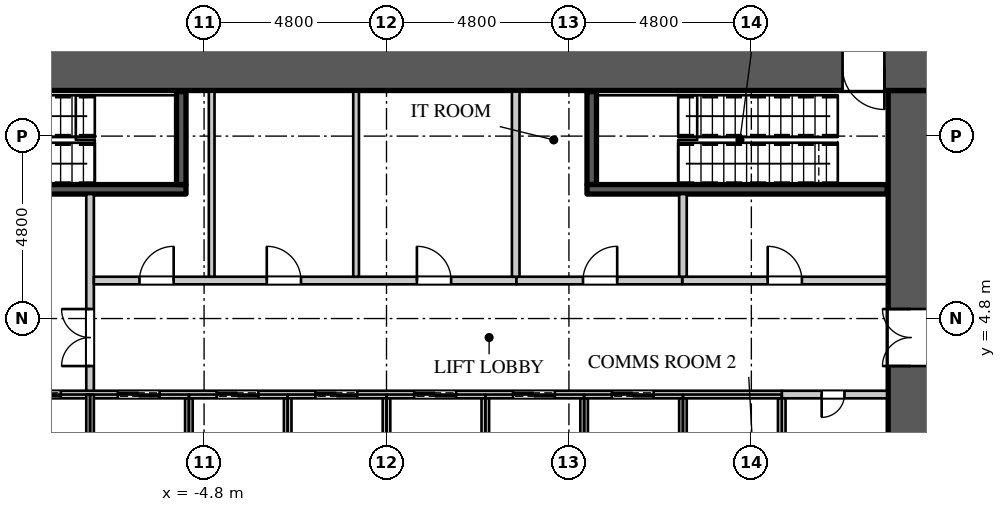
"""IFC4 building model, lengths in metres.
Left out: names, types, materials, properties, quantities, classifications, styles, units other than length and angle.
Written with IfcOpenShell. Run it as: python <this file> out.ifc"""

import sys

from ifc_helpers import new_model, si_unit, direction, frame, frame_2d, origin, place, context, subcontext, project, spatial, rectangle, extrude, element, fill, save


model = new_model("IFC4")
c1 = context("Model", 3, precision=1e-05, world=origin(), true_north=direction((0.0, 1.0)))
c2 = subcontext(c1, "Body", "Model", "MODEL_VIEW")
j1 = project(units=[si_unit("LENGTHUNIT", "METRE"), si_unit("PLANEANGLEUNIT", "RADIAN")], contexts=[c1])
p1 = place(None, origin())
s1 = spatial("IfcSite", under=j1, at=p1, CompositionType="ELEMENT")
p2 = place(p1, origin())
s2 = spatial("IfcBuilding", under=s1, at=p2, CompositionType="ELEMENT")
p3 = place(p2, frame((0.0, 0.0, 11.0)))
s3 = spatial("IfcBuildingStorey", under=s2, at=p3, CompositionType="ELEMENT", Elevation=11.0)
p4 = place(p3, frame((-14.4, 11.4, 0.0), z_axis=(0.0, 0.0, 1.0), x_axis=(1.0, 0.0, 0.0)))
e1 = element("IfcWall", 1, at=p4, inside=s3, PredefinedType="SHEAR", context=c2, shape_type="SweptSolid", body=[
    extrude(rectangle(XDim=28.8, YDim=1.2, at=frame_2d((14.4, 0.0))), origin(), (0.0, 0.0, 1.0), 5.0),
])
p5 = place(p4, frame((1.3, 0.0, 0.0)))
e2 = element("IfcOpeningElement", 2, at=p5, cuts=e1, PredefinedType="OPENING", context=c2, shape_type="SweptSolid", body=[
    extrude(rectangle(XDim=1.1, YDim=2.2, at=frame_2d((0.55, 1.1))), frame((0.0, 0.61, 0.0), z_axis=(0.0, -1.0, 0.0), x_axis=(1.0, 0.0, 0.0)), (0.0, 0.0, 1.0), 1.22),
])
p6 = place(p4, frame((26.4, 0.0, 0.0)))
e3 = element("IfcOpeningElement", 3, at=p6, cuts=e1, PredefinedType="OPENING", context=c2, shape_type="SweptSolid", body=[
    extrude(rectangle(XDim=1.1, YDim=2.2, at=frame_2d((0.55, 1.1))), frame((0.0, 0.61, 0.0), z_axis=(0.0, -1.0, 0.0), x_axis=(1.0, 0.0, 0.0)), (0.0, 0.0, 1.0), 1.22),
])
p7 = place(p3, frame((13.8, -10.8, 0.0), z_axis=(0.0, 0.0, 1.0), x_axis=(0.0, 1.0, 0.0)))
e4 = element("IfcWall", 4, at=p7, inside=s3, PredefinedType="SHEAR", context=c2, shape_type="SweptSolid", body=[
    extrude(rectangle(XDim=21.6, YDim=1.2, at=frame_2d((10.8, 0.0))), origin(), (0.0, 0.0, 1.0), 5.0),
])
p8 = place(p7, frame((14.35, 0.0, 0.0)))
e5 = element("IfcOpeningElement", 5, at=p8, cuts=e4, PredefinedType="OPENING", context=c2, shape_type="SweptSolid", body=[
    extrude(rectangle(XDim=1.5, YDim=2.4, at=frame_2d((0.75, 1.2))), frame((0.0, 0.61, 0.0), z_axis=(0.0, -1.0, 0.0), x_axis=(1.0, 0.0, 0.0)), (0.0, 0.0, 1.0), 1.22),
])
p9 = place(p7, frame((5.75, 0.0, 0.0)))
e6 = element("IfcOpeningElement", 6, at=p9, cuts=e4, PredefinedType="OPENING", context=c2, shape_type="SweptSolid", body=[
    extrude(rectangle(XDim=1.5, YDim=2.4, at=frame_2d((0.75, 1.2))), frame((0.0, 0.61, 0.0), z_axis=(0.0, -1.0, 0.0), x_axis=(1.0, 0.0, 0.0)), (0.0, 0.0, 1.0), 1.22),
])
p10 = place(p3, frame((-7.8, 2.8, 0.0), z_axis=(0.0, 0.0, 1.0), x_axis=(0.0, 1.0, 0.0)))
e7 = element("IfcWall", 7, at=p10, inside=s3, PredefinedType="PARTITIONING", context=c2, shape_type="SweptSolid", body=[
    extrude(rectangle(XDim=5.275, YDim=0.2, at=frame_2d((2.637, 0.0))), origin(), (0.0, 0.0, 1.0), 4.65),
])
p11 = place(p10, frame((0.75, 0.0, 0.0)))
e8 = element("IfcOpeningElement", 8, at=p11, cuts=e7, PredefinedType="OPENING", context=c2, shape_type="SweptSolid", body=[
    extrude(rectangle(XDim=1.5, YDim=2.4, at=frame_2d((0.75, 1.2))), frame((0.0, 0.11, 0.0), z_axis=(0.0, -1.0, 0.0), x_axis=(1.0, 0.0, 0.0)), (0.0, 0.0, 1.0), 0.22),
])
p12 = place(p3, frame((-7.7, 5.8, 0.0), z_axis=(0.0, 0.0, 1.0), x_axis=(1.0, 0.0, 0.0)))
e9 = element("IfcWall", 9, at=p12, inside=s3, PredefinedType="PARTITIONING", context=c2, shape_type="SweptSolid", body=[
    extrude(rectangle(XDim=11.12, YDim=0.2, at=frame_2d((5.56, 0.0))), origin(), (0.0, 0.0, 1.0), 4.65),
])
p13 = place(p12, frame((1.2, 0.0, 0.0)))
e10 = element("IfcOpeningElement", 10, at=p13, cuts=e9, PredefinedType="OPENING", context=c2, shape_type="SweptSolid", body=[
    extrude(rectangle(XDim=0.9, YDim=2.2, at=frame_2d((0.45, 1.1))), frame((0.0, 0.11, 0.0), z_axis=(0.0, -1.0, 0.0), x_axis=(1.0, 0.0, 0.0)), (0.0, 0.0, 1.0), 0.22),
])
p14 = place(p12, frame((4.55, 0.0, 0.0)))
e11 = element("IfcOpeningElement", 11, at=p14, cuts=e9, PredefinedType="OPENING", context=c2, shape_type="SweptSolid", body=[
    extrude(rectangle(XDim=0.9, YDim=2.2, at=frame_2d((0.45, 1.1))), frame((0.0, 0.11, 0.0), z_axis=(0.0, -1.0, 0.0), x_axis=(1.0, 0.0, 0.0)), (0.0, 0.0, 1.0), 0.22),
])
p15 = place(p12, frame((8.5, 0.0, 0.0)))
e12 = element("IfcOpeningElement", 12, at=p15, cuts=e9, PredefinedType="OPENING", context=c2, shape_type="SweptSolid", body=[
    extrude(rectangle(XDim=0.9, YDim=2.2, at=frame_2d((0.45, 1.1))), frame((0.0, 0.11, 0.0), z_axis=(0.0, -1.0, 0.0), x_axis=(1.0, 0.0, 0.0)), (0.0, 0.0, 1.0), 0.22),
])
p16 = place(p3, frame((7.78, 5.8, 0.0), z_axis=(0.0, 0.0, 1.0), x_axis=(1.0, 0.0, 0.0)))
e13 = element("IfcWall", 13, at=p16, inside=s3, PredefinedType="PARTITIONING", context=c2, shape_type="SweptSolid", body=[
    extrude(rectangle(XDim=5.39, YDim=0.2, at=frame_2d((2.695, 0.0))), origin(), (0.0, 0.0, 1.0), 4.65),
])
p17 = place(p16, frame((2.25, 0.0, 0.0)))
e14 = element("IfcOpeningElement", 14, at=p17, cuts=e13, PredefinedType="OPENING", context=c2, shape_type="SweptSolid", body=[
    extrude(rectangle(XDim=0.9, YDim=2.2, at=frame_2d((0.45, 1.1))), frame((0.0, 0.11, 0.0), z_axis=(0.0, -1.0, 0.0), x_axis=(1.0, 0.0, 0.0)), (0.0, 0.0, 1.0), 0.22),
])
for number, where, z_axis, x_axis in (
    (15, (-4.6, 5.9, 0.0), (0.0, 0.0, 1.0), (0.0, 1.0, 0.0)),
    (16, (-0.8, 5.9, 0.0), (0.0, 0.0, 1.0), (0.0, 1.0, 0.0)),
):
    element("IfcWall", number, at=place(p3, frame(where, z_axis=z_axis, x_axis=x_axis)), inside=s3, PredefinedType="PARTITIONING", context=c2, shape_type="SweptSolid", body=[
        extrude(rectangle(XDim=4.87, YDim=0.15, at=frame_2d((2.435, 0.0))), origin(), (0.0, 0.0, 1.0), 4.65),
    ])
p18 = place(p3, frame((3.42, 5.8, 0.0), z_axis=(0.0, 0.0, 1.0), x_axis=(1.0, 0.0, 0.0)))
e17 = element("IfcWall", 17, at=p18, inside=s3, PredefinedType="PARTITIONING", context=c2, shape_type="SweptSolid", body=[
    extrude(rectangle(XDim=4.36, YDim=0.2, at=frame_2d((2.18, 0.0))), origin(), (0.0, 0.0, 1.0), 4.65),
])
p19 = place(p18, frame((1.75, 0.0, 0.0)))
e18 = element("IfcOpeningElement", 18, at=p19, cuts=e17, PredefinedType="OPENING", context=c2, shape_type="SweptSolid", body=[
    extrude(rectangle(XDim=0.9, YDim=2.2, at=frame_2d((0.45, 1.1))), frame((0.0, 0.11, 0.0), z_axis=(0.0, -1.0, 0.0), x_axis=(1.0, 0.0, 0.0)), (0.0, 0.0, 1.0), 0.22),
])
p20 = place(p3, frame((3.4, 5.9, 0.0), z_axis=(0.0, 0.0, 1.0), x_axis=(0.0, 1.0, 0.0)))
e19 = element("IfcWall", 19, at=p20, inside=s3, PredefinedType="PARTITIONING", context=c2, shape_type="SweptSolid", body=[
    extrude(rectangle(XDim=4.87, YDim=0.2, at=frame_2d((2.435, 0.0))), origin(), (0.0, 0.0, 1.0), 4.65),
])
p21 = place(p3, frame((7.8, 5.9, 0.0), z_axis=(0.0, 0.0, 1.0), x_axis=(0.0, 1.0, 0.0)))
e20 = element("IfcWall", 20, at=p21, inside=s3, PredefinedType="PARTITIONING", context=c2, shape_type="SweptSolid", body=[
    extrude(rectangle(XDim=2.175, YDim=0.2, at=frame_2d((1.087, 0.0))), origin(), (0.0, 0.0, 1.0), 4.65),
])
p22 = place(p3, frame((10.4, 2.8, 0.0), z_axis=(0.0, 0.0, 1.0), x_axis=(1.0, 0.0, 0.0)))
e21 = element("IfcWall", 21, at=p22, inside=s3, PredefinedType="PARTITIONING", context=c2, shape_type="SweptSolid", body=[
    extrude(rectangle(XDim=2.77, YDim=0.2, at=frame_2d((1.385, 0.0))), origin(), (0.0, 0.0, 1.0), 4.65),
])
p23 = place(p22, frame((1.05, 0.0, 0.0)))
e22 = element("IfcOpeningElement", 22, at=p23, cuts=e21, PredefinedType="OPENING", context=c2, shape_type="SweptSolid", body=[
    extrude(rectangle(XDim=0.6, YDim=2.0, at=frame_2d((0.3, 1.0))), frame((0.0, 0.11, 0.0), z_axis=(0.0, -1.0, 0.0), x_axis=(1.0, 0.0, 0.0)), (0.0, 0.0, 1.0), 0.22),
])
p24 = place(p3, frame((-13.17, 2.8, 0.0), z_axis=(0.0, 0.0, 1.0), x_axis=(1.0, 0.0, 0.0)))
e23 = element("IfcWall", 23, at=p24, inside=s3, PredefinedType="PARTITIONING", context=c2, shape_type="SweptSolid", body=[
    extrude(rectangle(XDim=23.57, YDim=0.2, at=frame_2d((11.785, 0.0))), origin(), (0.0, 0.0, 1.0), 4.65),
])
p25 = place(p24, frame((0.8, 0.0, 0.0)))
e24 = element("IfcOpeningElement", 24, at=p25, cuts=e23, PredefinedType="OPENING", context=c2, shape_type="SweptSolid", body=[
    extrude(rectangle(XDim=1.1, YDim=2.2, at=frame_2d((0.55, 1.1))), frame((0.0, 0.11, 0.0), z_axis=(0.0, -1.0, 0.0), x_axis=(1.0, 0.0, 0.0)), (0.0, 0.0, 1.0), 0.22),
])
p26 = place(p24, frame((3.5, 0.0, 0.0)))
e25 = element("IfcOpeningElement", 25, at=p26, cuts=e23, PredefinedType="OPENING", context=c2, shape_type="SweptSolid", body=[
    extrude(rectangle(XDim=1.1, YDim=2.2, at=frame_2d((0.55, 1.1))), frame((0.0, 0.11, 0.0), z_axis=(0.0, -1.0, 0.0), x_axis=(1.0, 0.0, 0.0)), (0.0, 0.0, 1.0), 0.22),
])
p27 = place(p24, frame((6.1, 0.0, 0.0)))
e26 = element("IfcOpeningElement", 26, at=p27, cuts=e23, PredefinedType="OPENING", context=c2, shape_type="SweptSolid", body=[
    extrude(rectangle(XDim=1.1, YDim=2.2, at=frame_2d((0.55, 1.1))), frame((0.0, 0.11, 0.0), z_axis=(0.0, -1.0, 0.0), x_axis=(1.0, 0.0, 0.0)), (0.0, 0.0, 1.0), 0.22),
])
p28 = place(p24, frame((8.7, 0.0, 0.0)))
e27 = element("IfcOpeningElement", 27, at=p28, cuts=e23, PredefinedType="OPENING", context=c2, shape_type="SweptSolid", body=[
    extrude(rectangle(XDim=1.1, YDim=2.2, at=frame_2d((0.55, 1.1))), frame((0.0, 0.11, 0.0), z_axis=(0.0, -1.0, 0.0), x_axis=(1.0, 0.0, 0.0)), (0.0, 0.0, 1.0), 0.22),
])
p29 = place(p24, frame((11.3, 0.0, 0.0)))
e28 = element("IfcOpeningElement", 28, at=p29, cuts=e23, PredefinedType="OPENING", context=c2, shape_type="SweptSolid", body=[
    extrude(rectangle(XDim=1.1, YDim=2.2, at=frame_2d((0.55, 1.1))), frame((0.0, 0.11, 0.0), z_axis=(0.0, -1.0, 0.0), x_axis=(1.0, 0.0, 0.0)), (0.0, 0.0, 1.0), 0.22),
])
p30 = place(p24, frame((13.9, 0.0, 0.0)))
e29 = element("IfcOpeningElement", 29, at=p30, cuts=e23, PredefinedType="OPENING", context=c2, shape_type="SweptSolid", body=[
    extrude(rectangle(XDim=1.1, YDim=2.2, at=frame_2d((0.55, 1.1))), frame((0.0, 0.11, 0.0), z_axis=(0.0, -1.0, 0.0), x_axis=(1.0, 0.0, 0.0)), (0.0, 0.0, 1.0), 0.22),
])
p31 = place(p24, frame((16.5, 0.0, 0.0)))
e30 = element("IfcOpeningElement", 30, at=p31, cuts=e23, PredefinedType="OPENING", context=c2, shape_type="SweptSolid", body=[
    extrude(rectangle(XDim=1.1, YDim=2.2, at=frame_2d((0.55, 1.1))), frame((0.0, 0.11, 0.0), z_axis=(0.0, -1.0, 0.0), x_axis=(1.0, 0.0, 0.0)), (0.0, 0.0, 1.0), 0.22),
])
p32 = place(p24, frame((19.1, 0.0, 0.0)))
e31 = element("IfcOpeningElement", 31, at=p32, cuts=e23, PredefinedType="OPENING", context=c2, shape_type="SweptSolid", body=[
    extrude(rectangle(XDim=1.1, YDim=2.2, at=frame_2d((0.55, 1.1))), frame((0.0, 0.11, 0.0), z_axis=(0.0, -1.0, 0.0), x_axis=(1.0, 0.0, 0.0)), (0.0, 0.0, 1.0), 0.22),
])
p33 = place(p3, frame((-7.8, 0.0, 0.0), z_axis=(0.0, 0.0, 1.0), x_axis=(0.0, 1.0, 0.0)))
e32 = element("IfcWall", 32, at=p33, inside=s3, PredefinedType="PARTITIONING", context=c2, shape_type="SweptSolid", body=[
    extrude(rectangle(XDim=2.8, YDim=0.2, at=frame_2d((1.4, 0.0))), origin(), (0.0, 0.0, 1.0), 4.65),
])
for number, where, z_axis, x_axis in (
    (33, (-5.2, 0.1, 0.0), (0.0, 0.0, 1.0), (0.0, 1.0, 0.0)),
    (34, (-2.6, 0.1, 0.0), (0.0, 0.0, 1.0), (0.0, 1.0, 0.0)),
    (35, (0.0, 0.1, 0.0), (0.0, 0.0, 1.0), (0.0, 1.0, 0.0)),
    (36, (2.6, 0.1, 0.0), (0.0, 0.0, 1.0), (0.0, 1.0, 0.0)),
    (37, (5.2, 0.1, 0.0), (0.0, 0.0, 1.0), (0.0, 1.0, 0.0)),
):
    element("IfcWall", number, at=place(p3, frame(where, z_axis=z_axis, x_axis=x_axis)), inside=s3, PredefinedType="PARTITIONING", context=c2, shape_type="SweptSolid", body=[
        extrude(rectangle(XDim=2.6, YDim=0.2, at=frame_2d((1.3, 0.0))), origin(), (0.0, 0.0, 1.0), 4.65),
    ])
p34 = place(p3, frame((7.8, 0.0, 0.0), z_axis=(0.0, 0.0, 1.0), x_axis=(0.0, 1.0, 0.0)))
e38 = element("IfcWall", 38, at=p34, inside=s3, PredefinedType="PARTITIONING", context=c2, shape_type="SweptSolid", body=[
    extrude(rectangle(XDim=2.7, YDim=0.2, at=frame_2d((1.35, 0.0))), origin(), (0.0, 0.0, 1.0), 4.65),
])
p35 = place(p3, frame((10.4, -2.7, 0.0), z_axis=(0.0, 0.0, 1.0), x_axis=(0.0, 1.0, 0.0)))
e39 = element("IfcWall", 39, at=p35, inside=s3, PredefinedType="PARTITIONING", context=c2, shape_type="SweptSolid", body=[
    extrude(rectangle(XDim=5.4, YDim=0.2, at=frame_2d((2.7, 0.0))), origin(), (0.0, 0.0, 1.0), 4.65),
])
p36 = place(p3, frame((-13.17, 8.2, 0.0), z_axis=(0.0, 0.0, 1.0), x_axis=(1.0, 0.0, 0.0)))
e40 = element("IfcWall", 40, at=p36, inside=s3, PredefinedType="SHEAR", context=c2, shape_type="SweptSolid", body=[
    extrude(rectangle(XDim=7.895, YDim=0.25, at=frame_2d((3.948, 0.0))), origin(), (0.0, 0.0, 1.0), 4.65),
])
p37 = place(p36, frame((0.15, 0.0, 0.0)))
e41 = element("IfcOpeningElement", 41, at=p37, cuts=e40, PredefinedType="OPENING", context=c2, shape_type="SweptSolid", body=[
    extrude(rectangle(XDim=1.1, YDim=2.2, at=frame_2d((0.55, 1.1))), frame((0.0, 0.135, 0.0), z_axis=(0.0, -1.0, 0.0), x_axis=(1.0, 0.0, 0.0)), (0.0, 0.0, 1.0), 0.27),
])
for number, where, z_axis, x_axis in (
    (42, (-5.4, 8.325, 0.0), (0.0, 0.0, 1.0), (0.0, 1.0, 0.0)),
    (43, (5.4, 8.325, 0.0), (0.0, 0.0, 1.0), (0.0, 1.0, 0.0)),
):
    element("IfcWall", number, at=place(p3, frame(where, z_axis=z_axis, x_axis=x_axis)), inside=s3, PredefinedType="SHEAR", context=c2, shape_type="SweptSolid", body=[
        extrude(rectangle(XDim=2.445, YDim=0.25, at=frame_2d((1.223, 0.0))), origin(), (0.0, 0.0, 1.0), 4.65),
    ])
p38 = place(p3, frame((5.275, 8.2, 0.0), z_axis=(0.0, 0.0, 1.0), x_axis=(1.0, 0.0, 0.0)))
e44 = element("IfcWall", 44, at=p38, inside=s3, PredefinedType="SHEAR", context=c2, shape_type="SweptSolid", body=[
    extrude(rectangle(XDim=7.895, YDim=0.25, at=frame_2d((3.948, 0.0))), origin(), (0.0, 0.0, 1.0), 4.65),
])
p39 = place(p23, origin())
e45 = element("IfcDoor", 45, at=p39, inside=s3, OperationType="SINGLE_SWING_RIGHT", PredefinedType="DOOR", context=c2, shape_type="SweptSolid", body=[
    extrude(rectangle(XDim=0.6, YDim=2.0, at=frame_2d((0.3, 1.0))), frame((0.0, 0.025, 0.0), z_axis=(0.0, -1.0, 0.0), x_axis=(1.0, 0.0, 0.0)), (0.0, 0.0, 1.0), 0.05),
])
fill(e22, e45)
p40 = place(p13, origin())
e46 = element("IfcDoor", 46, at=p40, inside=s3, OperationType="SINGLE_SWING_RIGHT", PredefinedType="DOOR", context=c2, shape_type="SweptSolid", body=[
    extrude(rectangle(XDim=0.9, YDim=2.2, at=frame_2d((0.45, 1.1))), frame((0.0, 0.025, 0.0), z_axis=(0.0, -1.0, 0.0), x_axis=(1.0, 0.0, 0.0)), (0.0, 0.0, 1.0), 0.05),
])
fill(e10, e46)
p41 = place(p14, origin())
e47 = element("IfcDoor", 47, at=p41, inside=s3, OperationType="SINGLE_SWING_LEFT", PredefinedType="DOOR", context=c2, shape_type="SweptSolid", body=[
    extrude(rectangle(XDim=0.9, YDim=2.2, at=frame_2d((0.45, 1.1))), frame((0.0, 0.025, 0.0), z_axis=(0.0, -1.0, 0.0), x_axis=(1.0, 0.0, 0.0)), (0.0, 0.0, 1.0), 0.05),
])
fill(e11, e47)
p42 = place(p15, origin())
e48 = element("IfcDoor", 48, at=p42, inside=s3, OperationType="SINGLE_SWING_LEFT", PredefinedType="DOOR", context=c2, shape_type="SweptSolid", body=[
    extrude(rectangle(XDim=0.9, YDim=2.2, at=frame_2d((0.45, 1.1))), frame((0.0, 0.025, 0.0), z_axis=(0.0, -1.0, 0.0), x_axis=(1.0, 0.0, 0.0)), (0.0, 0.0, 1.0), 0.05),
])
fill(e12, e48)
p43 = place(p19, origin())
e49 = element("IfcDoor", 49, at=p43, inside=s3, OperationType="SINGLE_SWING_RIGHT", PredefinedType="DOOR", context=c2, shape_type="SweptSolid", body=[
    extrude(rectangle(XDim=0.9, YDim=2.2, at=frame_2d((0.45, 1.1))), frame((0.0, 0.025, 0.0), z_axis=(0.0, -1.0, 0.0), x_axis=(1.0, 0.0, 0.0)), (0.0, 0.0, 1.0), 0.05),
])
fill(e18, e49)
p44 = place(p17, origin())
e50 = element("IfcDoor", 50, at=p44, inside=s3, OperationType="SINGLE_SWING_LEFT", PredefinedType="DOOR", context=c2, shape_type="SweptSolid", body=[
    extrude(rectangle(XDim=0.9, YDim=2.2, at=frame_2d((0.45, 1.1))), frame((0.0, 0.025, 0.0), z_axis=(0.0, -1.0, 0.0), x_axis=(1.0, 0.0, 0.0)), (0.0, 0.0, 1.0), 0.05),
])
fill(e14, e50)
p45 = place(p26, origin())
e51 = element("IfcDoor", 51, at=p45, inside=s3, OperationType="DOUBLE_DOOR_SLIDING", PredefinedType="DOOR", context=c2, shape_type="SweptSolid", body=[
    extrude(rectangle(XDim=1.1, YDim=2.2, at=frame_2d((0.55, 1.1))), frame((0.0, 0.025, 0.0), z_axis=(0.0, -1.0, 0.0), x_axis=(1.0, 0.0, 0.0)), (0.0, 0.0, 1.0), 0.05),
])
fill(e25, e51)
p46 = place(p27, origin())
e52 = element("IfcDoor", 52, at=p46, inside=s3, OperationType="DOUBLE_DOOR_SLIDING", PredefinedType="DOOR", context=c2, shape_type="SweptSolid", body=[
    extrude(rectangle(XDim=1.1, YDim=2.2, at=frame_2d((0.55, 1.1))), frame((0.0, 0.025, 0.0), z_axis=(0.0, -1.0, 0.0), x_axis=(1.0, 0.0, 0.0)), (0.0, 0.0, 1.0), 0.05),
])
fill(e26, e52)
p47 = place(p28, origin())
e53 = element("IfcDoor", 53, at=p47, inside=s3, OperationType="DOUBLE_DOOR_SLIDING", PredefinedType="DOOR", context=c2, shape_type="SweptSolid", body=[
    extrude(rectangle(XDim=1.1, YDim=2.2, at=frame_2d((0.55, 1.1))), frame((0.0, 0.025, 0.0), z_axis=(0.0, -1.0, 0.0), x_axis=(1.0, 0.0, 0.0)), (0.0, 0.0, 1.0), 0.05),
])
fill(e27, e53)
p48 = place(p29, origin())
e54 = element("IfcDoor", 54, at=p48, inside=s3, OperationType="DOUBLE_DOOR_SLIDING", PredefinedType="DOOR", context=c2, shape_type="SweptSolid", body=[
    extrude(rectangle(XDim=1.1, YDim=2.2, at=frame_2d((0.55, 1.1))), frame((0.0, 0.025, 0.0), z_axis=(0.0, -1.0, 0.0), x_axis=(1.0, 0.0, 0.0)), (0.0, 0.0, 1.0), 0.05),
])
fill(e28, e54)
p49 = place(p30, origin())
e55 = element("IfcDoor", 55, at=p49, inside=s3, OperationType="DOUBLE_DOOR_SLIDING", PredefinedType="DOOR", context=c2, shape_type="SweptSolid", body=[
    extrude(rectangle(XDim=1.1, YDim=2.2, at=frame_2d((0.55, 1.1))), frame((0.0, 0.025, 0.0), z_axis=(0.0, -1.0, 0.0), x_axis=(1.0, 0.0, 0.0)), (0.0, 0.0, 1.0), 0.05),
])
fill(e29, e55)
p50 = place(p31, origin())
e56 = element("IfcDoor", 56, at=p50, inside=s3, OperationType="DOUBLE_DOOR_SLIDING", PredefinedType="DOOR", context=c2, shape_type="SweptSolid", body=[
    extrude(rectangle(XDim=1.1, YDim=2.2, at=frame_2d((0.55, 1.1))), frame((0.0, 0.025, 0.0), z_axis=(0.0, -1.0, 0.0), x_axis=(1.0, 0.0, 0.0)), (0.0, 0.0, 1.0), 0.05),
])
fill(e30, e56)
p51 = place(p32, origin())
e57 = element("IfcDoor", 57, at=p51, inside=s3, OperationType="DOUBLE_DOOR_SLIDING", PredefinedType="DOOR", context=c2, shape_type="SweptSolid", body=[
    extrude(rectangle(XDim=1.1, YDim=2.2, at=frame_2d((0.55, 1.1))), frame((0.0, 0.025, 0.0), z_axis=(0.0, -1.0, 0.0), x_axis=(1.0, 0.0, 0.0)), (0.0, 0.0, 1.0), 0.05),
])
fill(e31, e57)
p52 = place(p11, origin())
e58 = element("IfcDoor", 58, at=p52, inside=s3, OperationType="DOUBLE_DOOR_SINGLE_SWING", PredefinedType="DOOR", context=c2, shape_type="SweptSolid", body=[
    extrude(rectangle(XDim=1.5, YDim=2.4, at=frame_2d((0.75, 1.2))), frame((0.0, 0.025, 0.0), z_axis=(0.0, -1.0, 0.0), x_axis=(1.0, 0.0, 0.0)), (0.0, 0.0, 1.0), 0.05),
])
fill(e8, e58)
p53 = place(p8, origin())
e59 = element("IfcDoor", 59, at=p53, inside=s3, OperationType="DOUBLE_DOOR_SINGLE_SWING", PredefinedType="DOOR", context=c2, shape_type="SweptSolid", body=[
    extrude(rectangle(XDim=1.5, YDim=2.4, at=frame_2d((0.75, 1.2))), frame((0.0, 0.025, 0.0), z_axis=(0.0, -1.0, 0.0), x_axis=(1.0, 0.0, 0.0)), (0.0, 0.0, 1.0), 0.05),
])
fill(e5, e59)
p54 = place(p6, origin())
e60 = element("IfcDoor", 60, at=p54, inside=s3, OperationType="SINGLE_SWING_LEFT", PredefinedType="DOOR", context=c2, shape_type="SweptSolid", body=[
    extrude(rectangle(XDim=1.1, YDim=2.2, at=frame_2d((0.55, 1.1))), frame((0.0, 0.025, 0.0), z_axis=(0.0, -1.0, 0.0), x_axis=(1.0, 0.0, 0.0)), (0.0, 0.0, 1.0), 0.05),
])
fill(e3, e60)
save(model, sys.argv[1])
